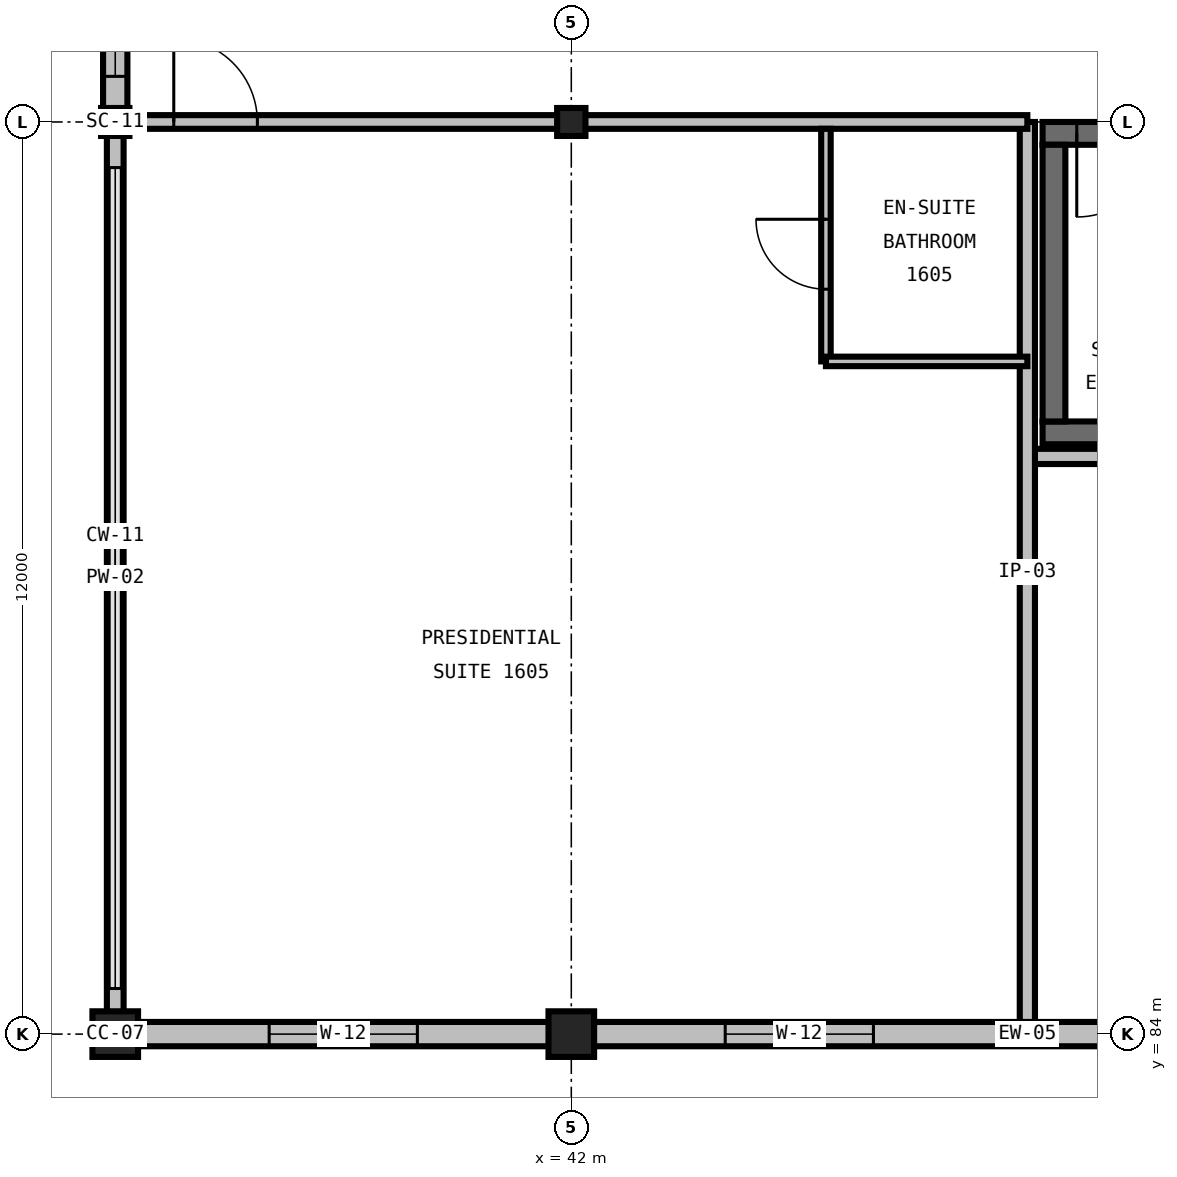
"""IFC4 building model, lengths in metres.
Left out: names, types, materials, properties, quantities, classifications, styles, units other than length and angle.
Written with IfcOpenShell. Run it as: python <this file> out.ifc"""

import sys

from ifc_helpers import new_model, si_unit, direction, frame, frame_2d, origin, origin_2d, place, context, subcontext, project, spatial, rectangle, i_section, extrude, element, fill, save


model = new_model("IFC4")
c1 = context("Model", 3, precision=1e-05, world=origin(), true_north=direction((0.0, 1.0)))
c2 = subcontext(c1, "Body", "Model", "MODEL_VIEW")
j1 = project(units=[si_unit("LENGTHUNIT", "METRE"), si_unit("PLANEANGLEUNIT", "RADIAN")], contexts=[c1])
p1 = place(None, origin())
s1 = spatial("IfcSite", under=j1, at=p1, CompositionType="ELEMENT")
p2 = place(p1, origin())
s2 = spatial("IfcBuilding", under=s1, at=p2, CompositionType="ELEMENT")
p3 = place(p2, frame((0.0, 0.0, 67.2)))
s3 = spatial("IfcBuildingStorey", under=s2, at=p3, CompositionType="ELEMENT", Elevation=67.2)
p4 = place(p3, frame((36.0, 84.0, 0.0), z_axis=(0.0, 0.0, 1.0), x_axis=(1.0, 0.0, 0.0)))
e1 = element("IfcColumn", 1, at=p4, inside=s3, PredefinedType="COLUMN", context=c2, shape_type="SweptSolid", body=[
    extrude(rectangle(XDim=0.6, YDim=0.6, at=origin_2d()), origin(), (0.0, 0.0, 1.0), 3.6),
])
p5 = place(p3, frame((36.0, 96.0, 0.0), z_axis=(0.0, 0.0, 1.0), x_axis=(1.0, 0.0, 0.0)))
e2 = element("IfcColumn", 2, at=p5, inside=s3, PredefinedType="COLUMN", context=c2, shape_type="SweptSolid", body=[
    extrude(i_section(OverallWidth=0.373, OverallDepth=0.368, WebThickness=0.015, FlangeThickness=0.024, FilletRadius=0.031, at=origin_2d()), origin(), (0.0, 0.0, 1.0), 3.6),
])
p6 = place(p3, frame((42.0, 84.0, 0.0), z_axis=(0.0, 0.0, 1.0), x_axis=(1.0, 0.0, 0.0)))
e3 = element("IfcColumn", 3, at=p6, inside=s3, PredefinedType="COLUMN", context=c2, shape_type="SweptSolid", body=[
    extrude(rectangle(XDim=0.6, YDim=0.6, at=origin_2d()), origin(), (0.0, 0.0, 1.0), 3.6),
])
p7 = place(p3, frame((42.0, 96.0, 0.0), z_axis=(0.0, 0.0, 1.0), x_axis=(1.0, 0.0, 0.0)))
e4 = element("IfcColumn", 4, at=p7, inside=s3, PredefinedType="COLUMN", context=c2, shape_type="SweptSolid", body=[
    extrude(i_section(OverallWidth=0.373, OverallDepth=0.368, WebThickness=0.015, FlangeThickness=0.024, FilletRadius=0.031, at=origin_2d()), origin(), (0.0, 0.0, 1.0), 3.6),
])
p8 = place(p3, frame((48.2, 91.91, 0.0), z_axis=(0.0, 0.0, 1.0), x_axis=(1.0, 0.0, 0.0)))
e5 = element("IfcWall", 5, at=p8, inside=s3, PredefinedType="SHEAR", context=c2, shape_type="SweptSolid", body=[
    extrude(rectangle(XDim=9.8, YDim=0.3, at=frame_2d((4.9, 0.0))), origin(), (0.0, 0.0, 1.0), 3.6),
])
p9 = place(p3, frame((58.0, 95.85, 0.0), z_axis=(0.0, 0.0, 1.0), x_axis=(-1.0, 0.0, 0.0)))
e6 = element("IfcWall", 6, at=p9, inside=s3, PredefinedType="SHEAR", context=c2, shape_type="SweptSolid", body=[
    extrude(rectangle(XDim=9.8, YDim=0.3, at=frame_2d((4.9, 0.0))), origin(), (0.0, 0.0, 1.0), 3.6),
])
p10 = place(p9, frame((8.25, 0.0, 0.0)))
e7 = element("IfcOpeningElement", 7, at=p10, cuts=e6, PredefinedType="OPENING", context=c2, shape_type="SweptSolid", body=[
    extrude(rectangle(XDim=1.1, YDim=2.2, at=frame_2d((0.55, 1.1))), frame((0.0, 0.165, 0.0), z_axis=(0.0, -1.0, 0.0), x_axis=(1.0, 0.0, 0.0)), (0.0, 0.0, 1.0), 0.33),
])
p11 = place(p3, frame((48.35, 95.7, 0.0), z_axis=(0.0, 0.0, 1.0), x_axis=(0.0, -1.0, 0.0)))
e8 = element("IfcWall", 8, at=p11, inside=s3, PredefinedType="SHEAR", context=c2, shape_type="SweptSolid", body=[
    extrude(rectangle(XDim=3.64, YDim=0.3, at=frame_2d((1.82, 0.0))), origin(), (0.0, 0.0, 1.0), 3.6),
])
p12 = place(p3, frame((36.0, 84.0, 0.0), z_axis=(0.0, 0.0, 1.0), x_axis=(1.0, 0.0, 0.0)))
e9 = element("IfcWall", 9, at=p12, inside=s3, PredefinedType="STANDARD", context=c2, shape_type="SweptSolid", body=[
    extrude(rectangle(XDim=6.0, YDim=0.32, at=frame_2d((3.0, 0.0))), origin(), (0.0, 0.0, 1.0), 2.526),
])
p13 = place(p12, frame((2.025, 0.0, 0.65)))
e10 = element("IfcOpeningElement", 10, at=p13, cuts=e9, PredefinedType="OPENING", context=c2, shape_type="SweptSolid", body=[
    extrude(rectangle(XDim=1.95, YDim=1.55, at=frame_2d((0.975, 0.775))), frame((0.0, 0.175, 0.0), z_axis=(0.0, -1.0, 0.0), x_axis=(1.0, 0.0, 0.0)), (0.0, 0.0, 1.0), 0.35),
])
p14 = place(p3, frame((42.0, 84.0, 0.0), z_axis=(0.0, 0.0, 1.0), x_axis=(1.0, 0.0, 0.0)))
e11 = element("IfcWall", 11, at=p14, inside=s3, PredefinedType="STANDARD", context=c2, shape_type="SweptSolid", body=[
    extrude(rectangle(XDim=12.0, YDim=0.32, at=frame_2d((6.0, 0.0))), origin(), (0.0, 0.0, 1.0), 2.526),
])
p15 = place(p14, frame((2.025, 0.0, 0.65)))
e12 = element("IfcOpeningElement", 12, at=p15, cuts=e11, PredefinedType="OPENING", context=c2, shape_type="SweptSolid", body=[
    extrude(rectangle(XDim=1.95, YDim=1.55, at=frame_2d((0.975, 0.775))), frame((0.0, 0.175, 0.0), z_axis=(0.0, -1.0, 0.0), x_axis=(1.0, 0.0, 0.0)), (0.0, 0.0, 1.0), 0.35),
])
p16 = place(p14, frame((8.025, 0.0, 0.65)))
e13 = element("IfcOpeningElement", 13, at=p16, cuts=e11, PredefinedType="OPENING", context=c2, shape_type="SweptSolid", body=[
    extrude(rectangle(XDim=1.95, YDim=1.55, at=frame_2d((0.975, 0.775))), frame((0.0, 0.175, 0.0), z_axis=(0.0, -1.0, 0.0), x_axis=(1.0, 0.0, 0.0)), (0.0, 0.0, 1.0), 0.35),
])
p17 = place(p3, frame((36.0, 96.0, 0.0), z_axis=(0.0, 0.0, 1.0), x_axis=(0.0, -1.0, 0.0)))
e14 = element("IfcWall", 14, at=p17, inside=s3, PredefinedType="PARAPET", context=c2, shape_type="SweptSolid", body=[
    extrude(rectangle(XDim=12.0, YDim=0.22, at=frame_2d((6.0, 0.0))), origin(), (0.0, 0.0, 1.0), 0.2),
])
p18 = place(p3, frame((36.0, 105.0, 0.0), z_axis=(0.0, 0.0, 1.0), x_axis=(0.0, -1.0, 0.0)))
e15 = element("IfcWall", 15, at=p18, inside=s3, PredefinedType="STANDARD", context=c2, shape_type="SweptSolid", body=[
    extrude(rectangle(XDim=9.0, YDim=0.32, at=frame_2d((4.5, 0.0))), origin(), (0.0, 0.0, 1.0), 2.971),
])
p19 = place(p18, frame((6.6, 0.0, 0.85)))
e16 = element("IfcOpeningElement", 16, at=p19, cuts=e15, PredefinedType="OPENING", context=c2, shape_type="SweptSolid", body=[
    extrude(rectangle(XDim=1.8, YDim=1.5, at=frame_2d((0.9, 0.75))), frame((0.0, 0.175, 0.0), z_axis=(0.0, -1.0, 0.0), x_axis=(1.0, 0.0, 0.0)), (0.0, 0.0, 1.0), 0.35),
])
p20 = place(p3, frame((48.0, 91.6, 0.0), z_axis=(0.0, 0.0, 1.0), x_axis=(1.0, 0.0, 0.0)))
e17 = element("IfcWall", 17, at=p20, inside=s3, PredefinedType="PARTITIONING", context=c2, shape_type="SweptSolid", body=[
    extrude(rectangle(XDim=10.4, YDim=0.2, at=frame_2d((5.2, 0.0))), origin(), (0.0, 0.0, 1.0), 3.28),
])
p21 = place(p3, frame((48.0, 84.16, 0.0), z_axis=(0.0, 0.0, 1.0), x_axis=(0.0, 1.0, 0.0)))
e18 = element("IfcWall", 18, at=p21, inside=s3, PredefinedType="PARTITIONING", context=c2, shape_type="SweptSolid", body=[
    extrude(rectangle(XDim=11.84, YDim=0.2, at=frame_2d((5.92, 0.0))), origin(), (0.0, 0.0, 1.0), 3.28),
])
p22 = place(p3, frame((36.085, 96.0, 0.0), z_axis=(0.0, 0.0, 1.0), x_axis=(1.0, 0.0, 0.0)))
e19 = element("IfcWall", 19, at=p22, inside=s3, PredefinedType="PARTITIONING", context=c2, shape_type="SweptSolid", body=[
    extrude(rectangle(XDim=11.915, YDim=0.18, at=frame_2d((5.957, 0.0))), origin(), (0.0, 0.0, 1.0), 2.349),
])
p23 = place(p22, frame((0.685, 0.0, 0.0)))
e20 = element("IfcOpeningElement", 20, at=p23, cuts=e19, PredefinedType="OPENING", context=c2, shape_type="SweptSolid", body=[
    extrude(rectangle(XDim=1.1, YDim=2.2, at=frame_2d((0.55, 1.1))), frame((0.0, 0.105, 0.0), z_axis=(0.0, -1.0, 0.0), x_axis=(1.0, 0.0, 0.0)), (0.0, 0.0, 1.0), 0.21),
])
p24 = place(p3, frame((45.35, 92.85, 0.0), z_axis=(0.0, 0.0, 1.0), x_axis=(0.0, 1.0, 0.0)))
e21 = element("IfcWall", 21, at=p24, inside=s3, PredefinedType="PARTITIONING", context=c2, shape_type="SweptSolid", body=[
    extrude(rectangle(XDim=3.06, YDim=0.125, at=frame_2d((1.53, 0.0))), origin(), (0.0, 0.0, 1.0), 3.28),
])
p25 = place(p24, frame((0.95, 0.0, 0.0)))
e22 = element("IfcOpeningElement", 22, at=p25, cuts=e21, PredefinedType="OPENING", context=c2, shape_type="SweptSolid", body=[
    extrude(rectangle(XDim=0.92, YDim=2.1, at=frame_2d((0.46, 1.05))), frame((0.0, 0.077, 0.0), z_axis=(0.0, -1.0, 0.0), x_axis=(1.0, 0.0, 0.0)), (0.0, 0.0, 1.0), 0.155),
])
p26 = place(p3, frame((45.35, 92.85, 0.0), z_axis=(0.0, 0.0, 1.0), x_axis=(1.0, 0.0, 0.0)))
e23 = element("IfcWall", 23, at=p26, inside=s3, PredefinedType="PARTITIONING", context=c2, shape_type="SweptSolid", body=[
    extrude(rectangle(XDim=2.65, YDim=0.125, at=frame_2d((1.325, 0.0))), origin(), (0.0, 0.0, 1.0), 3.28),
])
p27 = place(p10, origin())
e24 = element("IfcDoor", 24, at=p27, inside=s3, OperationType="SINGLE_SWING_RIGHT", PredefinedType="DOOR", context=c2, shape_type="SweptSolid", body=[
    extrude(rectangle(XDim=1.1, YDim=2.2, at=frame_2d((0.55, 1.1))), frame((0.0, 0.025, 0.0), z_axis=(0.0, -1.0, 0.0), x_axis=(1.0, 0.0, 0.0)), (0.0, 0.0, 1.0), 0.05),
])
fill(e7, e24)
p28 = place(p13, origin())
e25 = element("IfcWindow", 25, at=p28, inside=s3, PartitioningType="DOUBLE_PANEL_VERTICAL", PredefinedType="WINDOW", context=c2, shape_type="SweptSolid", body=[
    extrude(rectangle(XDim=1.95, YDim=1.55, at=frame_2d((0.975, 0.775))), frame((0.0, 0.03, 0.0), z_axis=(0.0, -1.0, 0.0), x_axis=(1.0, 0.0, 0.0)), (0.0, 0.0, 1.0), 0.06),
])
fill(e10, e25)
p29 = place(p15, origin())
e26 = element("IfcWindow", 26, at=p29, inside=s3, PartitioningType="DOUBLE_PANEL_VERTICAL", PredefinedType="WINDOW", context=c2, shape_type="SweptSolid", body=[
    extrude(rectangle(XDim=1.95, YDim=1.55, at=frame_2d((0.975, 0.775))), frame((0.0, 0.03, 0.0), z_axis=(0.0, -1.0, 0.0), x_axis=(1.0, 0.0, 0.0)), (0.0, 0.0, 1.0), 0.06),
])
fill(e12, e26)
p30 = place(p19, origin())
e27 = element("IfcWindow", 27, at=p30, inside=s3, PartitioningType="SINGLE_PANEL", PredefinedType="WINDOW", context=c2, shape_type="SweptSolid", body=[
    extrude(rectangle(XDim=1.8, YDim=1.5, at=frame_2d((0.9, 0.75))), frame((0.0, 0.03, 0.0), z_axis=(0.0, -1.0, 0.0), x_axis=(1.0, 0.0, 0.0)), (0.0, 0.0, 1.0), 0.06),
])
fill(e16, e27)
p31 = place(p23, origin())
e28 = element("IfcDoor", 28, at=p31, inside=s3, OperationType="SINGLE_SWING_LEFT", PredefinedType="DOOR", context=c2, shape_type="SweptSolid", body=[
    extrude(rectangle(XDim=1.1, YDim=2.2, at=frame_2d((0.55, 1.1))), frame((0.0, 0.025, 0.0), z_axis=(0.0, -1.0, 0.0), x_axis=(1.0, 0.0, 0.0)), (0.0, 0.0, 1.0), 0.05),
])
fill(e20, e28)
p32 = place(p25, origin())
e29 = element("IfcDoor", 29, at=p32, inside=s3, OperationType="SINGLE_SWING_RIGHT", PredefinedType="DOOR", context=c2, shape_type="SweptSolid", body=[
    extrude(rectangle(XDim=0.92, YDim=2.1, at=frame_2d((0.46, 1.05))), frame((0.0, 0.025, 0.0), z_axis=(0.0, -1.0, 0.0), x_axis=(1.0, 0.0, 0.0)), (0.0, 0.0, 1.0), 0.05),
])
fill(e22, e29)
save(model, sys.argv[1])
